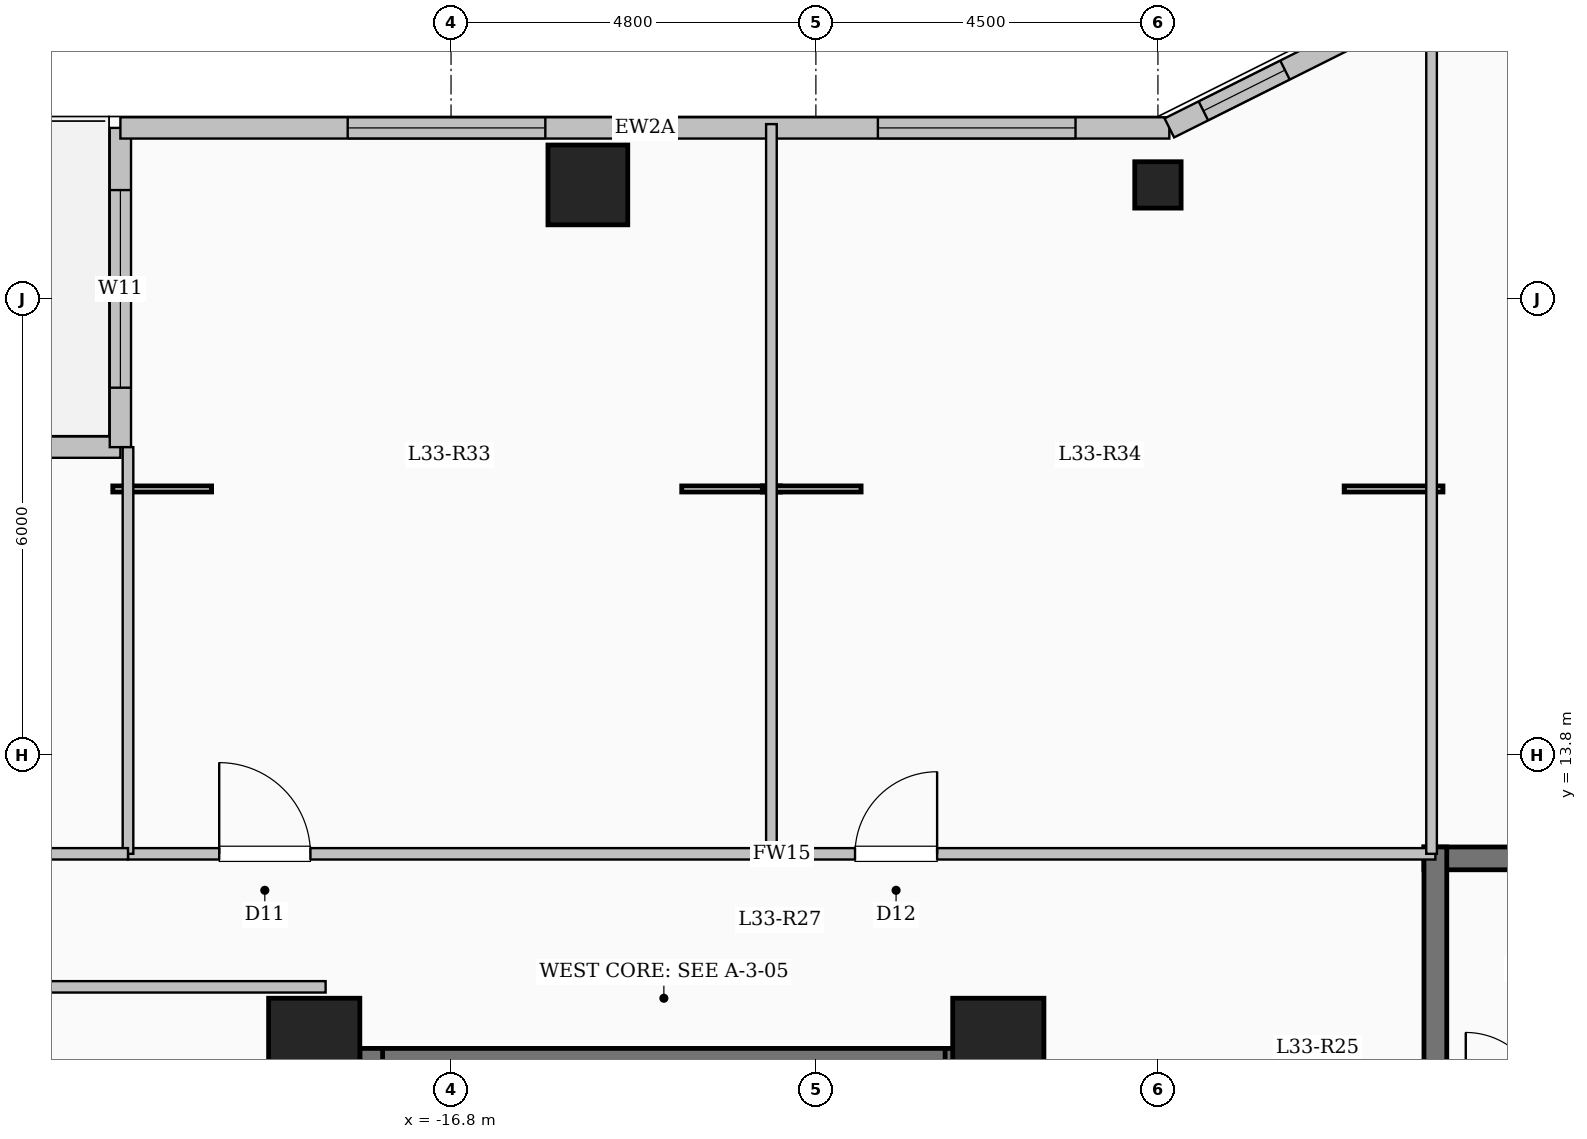
"""IFC4 building model, lengths in metres.
Left out: names, types, materials, properties, quantities, classifications, styles, units other than length and angle.
Written with IfcOpenShell. Run it as: python <this file> out.ifc"""

import sys

from ifc_helpers import new_model, si_unit, direction, frame, frame_2d, origin, origin_2d, place, context, subcontext, project, spatial, rectangle, hollow_circle, extrude, element, fill, save


model = new_model("IFC4")
c1 = context("Model", 3, precision=1e-05, world=origin(), true_north=direction((0.0, 1.0)))
c2 = subcontext(c1, "Body", "Model", "MODEL_VIEW")
j1 = project(units=[si_unit("LENGTHUNIT", "METRE"), si_unit("PLANEANGLEUNIT", "RADIAN")], contexts=[c1])
p1 = place(None, origin())
s1 = spatial("IfcSite", under=j1, at=p1, CompositionType="ELEMENT")
p2 = place(p1, origin())
s2 = spatial("IfcBuilding", under=s1, at=p2, CompositionType="ELEMENT")
p3 = place(p2, frame((0.0, 0.0, 123.0)))
s3 = spatial("IfcBuildingStorey", under=s2, at=p3, CompositionType="ELEMENT", Elevation=123.0)
for number, where, z_axis, x_axis in (
    (1, (-9.6, 10.0, 0.0), (0.0, 0.0, 1.0), (1.0, 0.0, 0.0)),
    (2, (-18.6, 10.0, 0.0), (0.0, 0.0, 1.0), (1.0, 0.0, 0.0)),
):
    element("IfcColumn", number, at=place(p3, frame(where, z_axis=z_axis, x_axis=x_axis)), inside=s3, PredefinedType="COLUMN", context=c2, shape_type="SweptSolid", body=[
        extrude(rectangle(XDim=1.2, YDim=1.2, at=origin_2d()), origin(), (0.0, 0.0, 1.0), 4.5),
    ])
p4 = place(p3, frame((-15.0, 21.3, 0.0), z_axis=(0.0, 0.0, 1.0), x_axis=(1.0, 0.0, 0.0)))
e3 = element("IfcColumn", 3, at=p4, inside=s3, PredefinedType="COLUMN", context=c2, shape_type="SweptSolid", body=[
    extrude(rectangle(XDim=1.05, YDim=1.05, at=origin_2d()), origin(), (0.0, 0.0, 1.0), 4.5),
])
p5 = place(p3, frame((-7.5, 21.3, 0.0), z_axis=(0.0, 0.0, 1.0), x_axis=(1.0, 0.0, 0.0)))
e4 = element("IfcColumn", 4, at=p5, inside=s3, PredefinedType="COLUMN", context=c2, shape_type="SweptSolid", body=[
    extrude(hollow_circle(Radius=0.305, WallThickness=0.025, at=origin_2d()), origin(), (0.0, 0.0, 1.0), 4.5),
])
p6 = place(p3, frame((-26.85, 17.85, 0.0), z_axis=(0.0, 0.0, 1.0), x_axis=(1.0, 0.0, 0.0)))
e5 = element("IfcWall", 5, at=p6, inside=s3, PredefinedType="SOLIDWALL", context=c2, shape_type="SweptSolid", body=[
    extrude(rectangle(XDim=5.7, YDim=0.28, at=frame_2d((2.85, 0.0))), origin(), (0.0, 0.0, 1.0), 4.2),
])
p7 = place(p6, frame((2.5, 0.0, 0.0)))
e6 = element("IfcOpeningElement", 6, at=p7, cuts=e5, PredefinedType="OPENING", context=c2, shape_type="SweptSolid", body=[
    extrude(rectangle(XDim=1.1, YDim=2.2, at=frame_2d((0.55, 1.1))), frame((0.0, 0.15, 0.0), z_axis=(0.0, -1.0, 0.0), x_axis=(1.0, 0.0, 0.0)), (0.0, 0.0, 1.0), 0.3),
])
p8 = place(p6, frame((0.755, 0.0, 0.95)))
e7 = element("IfcOpeningElement", 7, at=p8, cuts=e5, PredefinedType="OPENING", context=c2, shape_type="SweptSolid", body=[
    extrude(rectangle(XDim=1.2, YDim=1.5, at=frame_2d((0.6, 0.75))), frame((0.0, 0.15, 0.0), z_axis=(0.0, -1.0, 0.0), x_axis=(1.0, 0.0, 0.0)), (0.0, 0.0, 1.0), 0.3),
])
p9 = place(p3, frame((-21.15, 17.85, 0.0), z_axis=(0.0, 0.0, 1.0), x_axis=(0.0, 1.0, 0.0)))
e8 = element("IfcWall", 8, at=p9, inside=s3, PredefinedType="SOLIDWALL", context=c2, shape_type="SweptSolid", body=[
    extrude(rectangle(XDim=4.2, YDim=0.28, at=frame_2d((2.1, 0.0))), origin(), (0.0, 0.0, 1.0), 4.2),
])
p10 = place(p9, frame((0.782, 0.0, 0.85)))
e9 = element("IfcOpeningElement", 9, at=p10, cuts=e8, PredefinedType="OPENING", context=c2, shape_type="SweptSolid", body=[
    extrude(rectangle(XDim=2.6, YDim=2.4, at=frame_2d((1.3, 1.2))), frame((0.0, 0.15, 0.0), z_axis=(0.0, -1.0, 0.0), x_axis=(1.0, 0.0, 0.0)), (0.0, 0.0, 1.0), 0.3),
])
p11 = place(p3, frame((-21.15, 22.05, 0.0), z_axis=(0.0, 0.0, 1.0), x_axis=(1.0, 0.0, 0.0)))
e10 = element("IfcWall", 10, at=p11, inside=s3, PredefinedType="SOLIDWALL", context=c2, shape_type="SweptSolid", body=[
    extrude(rectangle(XDim=13.8, YDim=0.28, at=frame_2d((6.9, 0.0))), origin(), (0.0, 0.0, 1.0), 4.2),
])
p12 = place(p11, frame((2.99, 0.0, 0.85)))
e11 = element("IfcOpeningElement", 11, at=p12, cuts=e10, PredefinedType="OPENING", context=c2, shape_type="SweptSolid", body=[
    extrude(rectangle(XDim=2.6, YDim=2.4, at=frame_2d((1.3, 1.2))), frame((0.0, 0.15, 0.0), z_axis=(0.0, -1.0, 0.0), x_axis=(1.0, 0.0, 0.0)), (0.0, 0.0, 1.0), 0.3),
])
p13 = place(p11, frame((9.966, 0.0, 0.85)))
e12 = element("IfcOpeningElement", 12, at=p13, cuts=e10, PredefinedType="OPENING", context=c2, shape_type="SweptSolid", body=[
    extrude(rectangle(XDim=2.6, YDim=2.4, at=frame_2d((1.3, 1.2))), frame((0.0, 0.15, 0.0), z_axis=(0.0, -1.0, 0.0), x_axis=(1.0, 0.0, 0.0)), (0.0, 0.0, 1.0), 0.3),
])
p14 = place(p3, frame((-7.35, 22.05, 0.0), z_axis=(0.0, 0.0, 1.0), x_axis=(0.894427191, 0.4472135955, 0.0)))
e13 = element("IfcWall", 13, at=p14, inside=s3, PredefinedType="SOLIDWALL", context=c2, shape_type="SweptSolid", body=[
    extrude(rectangle(XDim=3.354, YDim=0.28, at=frame_2d((1.677, 0.0))), origin(), (0.0, 0.0, 1.0), 4.2),
])
p15 = place(p14, frame((0.501, 0.0, 0.95)))
e14 = element("IfcOpeningElement", 14, at=p15, cuts=e13, PredefinedType="OPENING", context=c2, shape_type="SweptSolid", body=[
    extrude(rectangle(XDim=1.2, YDim=1.5, at=frame_2d((0.6, 0.75))), frame((0.0, 0.15, 0.0), z_axis=(0.0, -1.0, 0.0), x_axis=(1.0, 0.0, 0.0)), (0.0, 0.0, 1.0), 0.3),
])
p16 = place(p3, frame((-18.0, 9.79, 0.0), z_axis=(0.0, 0.0, 1.0), x_axis=(1.0, 0.0, 0.0)))
e15 = element("IfcWall", 15, at=p16, inside=s3, PredefinedType="SHEAR", context=c2, shape_type="SweptSolid", body=[
    extrude(rectangle(XDim=8.0, YDim=0.3, at=frame_2d((4.0, 0.0))), origin(), (0.0, 0.0, 1.0), 4.5),
])
for number, where, z_axis, x_axis in (
    (16, (-17.85, 6.35, 0.0), (0.0, 0.0, 1.0), (0.0, 1.0, 0.0)),
    (17, (-10.15, 6.35, 0.0), (0.0, 0.0, 1.0), (0.0, 1.0, 0.0)),
):
    element("IfcWall", number, at=place(p3, frame(where, z_axis=z_axis, x_axis=x_axis)), inside=s3, PredefinedType="SHEAR", context=c2, shape_type="SweptSolid", body=[
        extrude(rectangle(XDim=3.59, YDim=0.3, at=frame_2d((1.795, 0.0))), origin(), (0.0, 0.0, 1.0), 4.5),
    ])
p17 = place(p3, frame((-4.0, 12.44, 0.0), z_axis=(0.0, 0.0, 1.0), x_axis=(1.0, 0.0, 0.0)))
e18 = element("IfcWall", 18, at=p17, inside=s3, PredefinedType="SHEAR", context=c2, shape_type="SweptSolid", body=[
    extrude(rectangle(XDim=8.0, YDim=0.3, at=frame_2d((4.0, 0.0))), origin(), (0.0, 0.0, 1.0), 4.5),
])
p18 = place(p3, frame((-3.85, 9.0, 0.0), z_axis=(0.0, 0.0, 1.0), x_axis=(0.0, 1.0, 0.0)))
e19 = element("IfcWall", 19, at=p18, inside=s3, PredefinedType="SHEAR", context=c2, shape_type="SweptSolid", body=[
    extrude(rectangle(XDim=3.59, YDim=0.3, at=frame_2d((1.795, 0.0))), origin(), (0.0, 0.0, 1.0), 4.5),
])
p19 = place(p3, frame((-21.05, 12.5, 0.0), z_axis=(0.0, 0.0, 1.0), x_axis=(1.0, 0.0, 0.0)))
e20 = element("IfcWall", 20, at=p19, inside=s3, PredefinedType="PARTITIONING", context=c2, shape_type="SweptSolid", body=[
    extrude(rectangle(XDim=17.2, YDim=0.15, at=frame_2d((8.6, 0.0))), origin(), (0.0, 0.0, 1.0), 4.2),
])
p20 = place(p19, frame((1.2, 0.0, 0.0)))
e21 = element("IfcOpeningElement", 21, at=p20, cuts=e20, PredefinedType="OPENING", context=c2, shape_type="SweptSolid", body=[
    extrude(rectangle(XDim=1.2, YDim=2.15, at=frame_2d((0.6, 1.075))), frame((0.0, 0.085, 0.0), z_axis=(0.0, -1.0, 0.0), x_axis=(1.0, 0.0, 0.0)), (0.0, 0.0, 1.0), 0.17),
])
p21 = place(p19, frame((9.565, 0.0, 0.0)))
e22 = element("IfcOpeningElement", 22, at=p21, cuts=e20, PredefinedType="OPENING", context=c2, shape_type="SweptSolid", body=[
    extrude(rectangle(XDim=1.08, YDim=2.15, at=frame_2d((0.54, 1.075))), frame((0.0, 0.085, 0.0), z_axis=(0.0, -1.0, 0.0), x_axis=(1.0, 0.0, 0.0)), (0.0, 0.0, 1.0), 0.17),
])
p22 = place(p3, frame((-3.9, 12.5, 0.0), z_axis=(0.0, 0.0, 1.0), x_axis=(0.0, 1.0, 0.0)))
e23 = element("IfcWall", 23, at=p22, inside=s3, PredefinedType="PARTITIONING", context=c2, shape_type="SweptSolid", body=[
    extrude(rectangle(XDim=11.08, YDim=0.14, at=frame_2d((5.54, 0.0))), origin(), (0.0, 0.0, 1.0), 4.2),
])
p23 = place(p3, frame((-12.585, 12.5, 0.0), z_axis=(0.0, 0.0, 1.0), x_axis=(0.0, 1.0, 0.0)))
e24 = element("IfcWall", 24, at=p23, inside=s3, PredefinedType="PARTITIONING", context=c2, shape_type="SweptSolid", body=[
    extrude(rectangle(XDim=9.6, YDim=0.14, at=frame_2d((4.8, 0.0))), origin(), (0.0, 0.0, 1.0), 4.2),
])
p24 = place(p3, frame((-26.88, 10.75, 0.0), z_axis=(0.0, 0.0, 1.0), x_axis=(1.0, 0.0, 0.0)))
e25 = element("IfcWall", 25, at=p24, inside=s3, PredefinedType="PARTITIONING", context=c2, shape_type="SweptSolid", body=[
    extrude(rectangle(XDim=8.43, YDim=0.15, at=frame_2d((4.215, 0.0))), origin(), (0.0, 0.0, 1.0), 4.2),
])
p25 = place(p3, frame((-21.05, 12.5, 0.0), z_axis=(0.0, 0.0, 1.0), x_axis=(0.0, 1.0, 0.0)))
e26 = element("IfcWall", 26, at=p25, inside=s3, PredefinedType="PARTITIONING", context=c2, shape_type="SweptSolid", body=[
    extrude(rectangle(XDim=5.35, YDim=0.14, at=frame_2d((2.675, 0.0))), origin(), (0.0, 0.0, 1.0), 4.2),
])
p26 = place(p3, frame((-26.88, 12.5, 0.0), z_axis=(0.0, 0.0, 1.0), x_axis=(1.0, 0.0, 0.0)))
e27 = element("IfcWall", 27, at=p26, inside=s3, PredefinedType="PARTITIONING", context=c2, shape_type="SweptSolid", body=[
    extrude(rectangle(XDim=5.83, YDim=0.15, at=frame_2d((2.915, 0.0))), origin(), (0.0, 0.0, 1.0), 4.2),
])
p27 = place(p26, frame((2.44, 0.0, 0.0)))
e28 = element("IfcOpeningElement", 28, at=p27, cuts=e27, PredefinedType="OPENING", context=c2, shape_type="SweptSolid", body=[
    extrude(rectangle(XDim=0.95, YDim=2.15, at=frame_2d((0.475, 1.075))), frame((0.0, 0.085, 0.0), z_axis=(0.0, -1.0, 0.0), x_axis=(1.0, 0.0, 0.0)), (0.0, 0.0, 1.0), 0.17),
])
p28 = place(p10, origin())
e29 = element("IfcWindow", 29, at=p28, inside=s3, PartitioningType="SINGLE_PANEL", PredefinedType="WINDOW", context=c2, shape_type="SweptSolid", body=[
    extrude(rectangle(XDim=2.6, YDim=2.4, at=frame_2d((1.3, 1.2))), frame((0.0, 0.03, 0.0), z_axis=(0.0, -1.0, 0.0), x_axis=(1.0, 0.0, 0.0)), (0.0, 0.0, 1.0), 0.06),
])
fill(e9, e29)
p29 = place(p12, origin())
e30 = element("IfcWindow", 30, at=p29, inside=s3, PartitioningType="SINGLE_PANEL", PredefinedType="WINDOW", context=c2, shape_type="SweptSolid", body=[
    extrude(rectangle(XDim=2.6, YDim=2.4, at=frame_2d((1.3, 1.2))), frame((0.0, 0.03, 0.0), z_axis=(0.0, -1.0, 0.0), x_axis=(1.0, 0.0, 0.0)), (0.0, 0.0, 1.0), 0.06),
])
fill(e11, e30)
p30 = place(p13, origin())
e31 = element("IfcWindow", 31, at=p30, inside=s3, PartitioningType="SINGLE_PANEL", PredefinedType="WINDOW", context=c2, shape_type="SweptSolid", body=[
    extrude(rectangle(XDim=2.6, YDim=2.4, at=frame_2d((1.3, 1.2))), frame((0.0, 0.03, 0.0), z_axis=(0.0, -1.0, 0.0), x_axis=(1.0, 0.0, 0.0)), (0.0, 0.0, 1.0), 0.06),
])
fill(e12, e31)
p31 = place(p15, origin())
e32 = element("IfcWindow", 32, at=p31, inside=s3, PartitioningType="SINGLE_PANEL", PredefinedType="WINDOW", context=c2, shape_type="SweptSolid", body=[
    extrude(rectangle(XDim=1.2, YDim=1.5, at=frame_2d((0.6, 0.75))), frame((0.0, 0.03, 0.0), z_axis=(0.0, -1.0, 0.0), x_axis=(1.0, 0.0, 0.0)), (0.0, 0.0, 1.0), 0.06),
])
fill(e14, e32)
p32 = place(p20, origin())
e33 = element("IfcDoor", 33, at=p32, inside=s3, OperationType="SINGLE_SWING_LEFT", PredefinedType="DOOR", context=c2, shape_type="SweptSolid", body=[
    extrude(rectangle(XDim=1.2, YDim=2.15, at=frame_2d((0.6, 1.075))), frame((0.0, 0.025, 0.0), z_axis=(0.0, -1.0, 0.0), x_axis=(1.0, 0.0, 0.0)), (0.0, 0.0, 1.0), 0.05),
])
fill(e21, e33)
p33 = place(p21, origin())
e34 = element("IfcDoor", 34, at=p33, inside=s3, OperationType="SINGLE_SWING_RIGHT", PredefinedType="DOOR", context=c2, shape_type="SweptSolid", body=[
    extrude(rectangle(XDim=1.08, YDim=2.15, at=frame_2d((0.54, 1.075))), frame((0.0, 0.025, 0.0), z_axis=(0.0, -1.0, 0.0), x_axis=(1.0, 0.0, 0.0)), (0.0, 0.0, 1.0), 0.05),
])
fill(e22, e34)
save(model, sys.argv[1])
